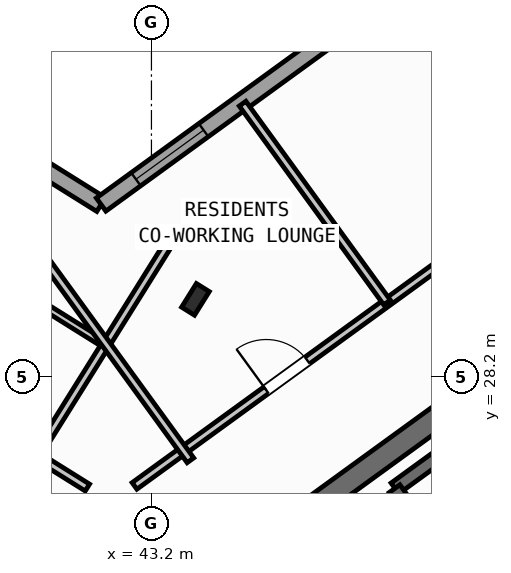
"""IFC4 building model, lengths in metres.
Left out: names, types, materials, properties, quantities, classifications, styles, units other than length and angle.
Written with IfcOpenShell. Run it as: python <this file> out.ifc"""

import sys

from ifc_helpers import new_model, si_unit, direction, frame, frame_2d, origin, origin_2d, place, context, subcontext, project, spatial, rectangle, i_section, extrude, source, transform, mapped, element, fill, save


model = new_model("IFC4")
c1 = context("Model", 3, precision=1e-05, world=origin(), true_north=direction((0.0, 1.0)))
c2 = subcontext(c1, "Body", "Model", "MODEL_VIEW")
j1 = project(units=[si_unit("LENGTHUNIT", "METRE"), si_unit("PLANEANGLEUNIT", "RADIAN")], contexts=[c1])
p1 = place(None, origin())
s1 = spatial("IfcSite", under=j1, at=p1, CompositionType="ELEMENT")
p2 = place(p1, origin())
s2 = spatial("IfcBuilding", under=s1, at=p2, CompositionType="ELEMENT")
p3 = place(p2, frame((0.0, 0.0, 214.8)))
s3 = spatial("IfcBuildingStorey", under=s2, at=p3, CompositionType="ELEMENT", Elevation=214.8)
p4 = place(p3, frame((44.406, 24.172, 0.0), z_axis=(0.0, 0.0, 1.0), x_axis=(0.809012867805, 0.587790931986, 0.0)))
e1 = element("IfcWall", 1, at=p4, inside=s3, PredefinedType="SHEAR", context=c2, shape_type="SweptSolid", body=[
    extrude(rectangle(XDim=12.24, YDim=0.45, at=frame_2d((6.12, 0.0))), origin(), (0.0, 0.0, 1.0), 3.35),
])
m1 = source(origin(), c2, "Body", "SweptSolid", [
    extrude(i_section(OverallWidth=0.3, OverallDepth=0.55, WebThickness=0.015, FlangeThickness=0.029, at=origin_2d()), origin(), (0.0, 0.0, 1.0), 3.6),
])
p5 = place(p3, frame((44.068, 29.726, 0.0), z_axis=(0.0, 0.0, 1.0), x_axis=(-0.848048096156, 0.529919264233, 0.0)))
e2 = element("IfcColumn", 2, at=p5, inside=s3, PredefinedType="COLUMN", context=c2, shape_type="MappedRepresentation", body=[
    mapped(m1, transform((0.0, 0.0, 0.0), scale=1.0)),
])
p6 = place(p3, frame((17.424, 47.083, 0.0), z_axis=(0.0, 0.0, 1.0), x_axis=(0.848049927979, -0.529916332693, 0.0)))
e3 = element("IfcWall", 3, at=p6, inside=s3, PredefinedType="STANDARD", context=c2, shape_type="SweptSolid", body=[
    extrude(rectangle(XDim=29.223, YDim=0.32, at=frame_2d((14.612, 0.0))), origin(), (0.0, 0.0, 1.0), 3.35),
])
p7 = place(p6, frame((2.526, 0.0, 0.0)))
e4 = element("IfcOpeningElement", 4, at=p7, cuts=e3, PredefinedType="OPENING", context=c2, shape_type="SweptSolid", body=[
    extrude(rectangle(XDim=1.05, YDim=2.15, at=frame_2d((0.525, 1.075))), frame((0.0, 0.17, 0.0), z_axis=(0.0, -1.0, 0.0), x_axis=(1.0, 0.0, 0.0)), (0.0, 0.0, 1.0), 0.34),
])
p8 = place(p6, frame((0.653, 0.0, 0.9)))
e5 = element("IfcOpeningElement", 5, at=p8, cuts=e3, PredefinedType="OPENING", context=c2, shape_type="SweptSolid", body=[
    extrude(rectangle(XDim=1.35, YDim=1.45, at=frame_2d((0.675, 0.725))), frame((0.0, 0.17, 0.0), z_axis=(0.0, -1.0, 0.0), x_axis=(1.0, 0.0, 0.0)), (0.0, 0.0, 1.0), 0.34),
])
p9 = place(p6, frame((6.897, 0.0, 1.0)))
e6 = element("IfcOpeningElement", 6, at=p9, cuts=e3, PredefinedType="OPENING", context=c2, shape_type="SweptSolid", body=[
    extrude(rectangle(XDim=0.9, YDim=1.25, at=frame_2d((0.45, 0.625))), frame((0.0, 0.17, 0.0), z_axis=(0.0, -1.0, 0.0), x_axis=(1.0, 0.0, 0.0)), (0.0, 0.0, 1.0), 0.34),
])
p10 = place(p6, frame((9.602, 0.0, 0.95)))
e7 = element("IfcOpeningElement", 7, at=p10, cuts=e3, PredefinedType="OPENING", context=c2, shape_type="SweptSolid", body=[
    extrude(rectangle(XDim=1.95, YDim=1.35, at=frame_2d((0.975, 0.675))), frame((0.0, 0.17, 0.0), z_axis=(0.0, -1.0, 0.0), x_axis=(1.0, 0.0, 0.0)), (0.0, 0.0, 1.0), 0.34),
])
p11 = place(p6, frame((14.096, 0.0, 1.0)))
e8 = element("IfcOpeningElement", 8, at=p11, cuts=e3, PredefinedType="OPENING", context=c2, shape_type="SweptSolid", body=[
    extrude(rectangle(XDim=0.9, YDim=1.25, at=frame_2d((0.45, 0.625))), frame((0.0, 0.17, 0.0), z_axis=(0.0, -1.0, 0.0), x_axis=(1.0, 0.0, 0.0)), (0.0, 0.0, 1.0), 0.34),
])
p12 = place(p6, frame((17.254, 0.0, 1.0)))
e9 = element("IfcOpeningElement", 9, at=p12, cuts=e3, PredefinedType="OPENING", context=c2, shape_type="SweptSolid", body=[
    extrude(rectangle(XDim=0.9, YDim=1.25, at=frame_2d((0.45, 0.625))), frame((0.0, 0.17, 0.0), z_axis=(0.0, -1.0, 0.0), x_axis=(1.0, 0.0, 0.0)), (0.0, 0.0, 1.0), 0.34),
])
p13 = place(p6, frame((21.139, 0.0, 0.9)))
e10 = element("IfcOpeningElement", 10, at=p13, cuts=e3, PredefinedType="OPENING", context=c2, shape_type="SweptSolid", body=[
    extrude(rectangle(XDim=1.35, YDim=1.45, at=frame_2d((0.675, 0.725))), frame((0.0, 0.17, 0.0), z_axis=(0.0, -1.0, 0.0), x_axis=(1.0, 0.0, 0.0)), (0.0, 0.0, 1.0), 0.34),
])
p14 = place(p6, frame((25.778, 0.0, 0.9)))
e11 = element("IfcOpeningElement", 11, at=p14, cuts=e3, PredefinedType="OPENING", context=c2, shape_type="SweptSolid", body=[
    extrude(rectangle(XDim=1.35, YDim=1.45, at=frame_2d((0.675, 0.725))), frame((0.0, 0.17, 0.0), z_axis=(0.0, -1.0, 0.0), x_axis=(1.0, 0.0, 0.0)), (0.0, 0.0, 1.0), 0.34),
])
p15 = place(p3, frame((42.207, 31.597, 0.0), z_axis=(0.0, 0.0, 1.0), x_axis=(0.809020333377, 0.587780656523, 0.0)))
e12 = element("IfcWall", 12, at=p15, inside=s3, PredefinedType="STANDARD", context=c2, shape_type="SweptSolid", body=[
    extrude(rectangle(XDim=15.223, YDim=0.32, at=frame_2d((7.611, 0.0))), origin(), (0.0, 0.0, 1.0), 3.35),
])
p16 = place(p15, frame((12.82, 0.0, 0.0)))
e13 = element("IfcOpeningElement", 13, at=p16, cuts=e12, PredefinedType="OPENING", context=c2, shape_type="SweptSolid", body=[
    extrude(rectangle(XDim=1.05, YDim=2.15, at=frame_2d((0.525, 1.075))), frame((0.0, 0.17, 0.0), z_axis=(0.0, -1.0, 0.0), x_axis=(1.0, 0.0, 0.0)), (0.0, 0.0, 1.0), 0.34),
])
p17 = place(p15, frame((0.85, 0.0, 0.9)))
e14 = element("IfcOpeningElement", 14, at=p17, cuts=e12, PredefinedType="OPENING", context=c2, shape_type="SweptSolid", body=[
    extrude(rectangle(XDim=1.65, YDim=1.45, at=frame_2d((0.825, 0.725))), frame((0.0, 0.17, 0.0), z_axis=(0.0, -1.0, 0.0), x_axis=(1.0, 0.0, 0.0)), (0.0, 0.0, 1.0), 0.34),
])
p18 = place(p15, frame((5.769, 0.0, 0.9)))
e15 = element("IfcOpeningElement", 15, at=p18, cuts=e12, PredefinedType="OPENING", context=c2, shape_type="SweptSolid", body=[
    extrude(rectangle(XDim=1.35, YDim=1.45, at=frame_2d((0.675, 0.725))), frame((0.0, 0.17, 0.0), z_axis=(0.0, -1.0, 0.0), x_axis=(1.0, 0.0, 0.0)), (0.0, 0.0, 1.0), 0.34),
])
p19 = place(p15, frame((10.219, 0.0, 1.0)))
e16 = element("IfcOpeningElement", 16, at=p19, cuts=e12, PredefinedType="OPENING", context=c2, shape_type="SweptSolid", body=[
    extrude(rectangle(XDim=0.9, YDim=1.25, at=frame_2d((0.45, 0.625))), frame((0.0, 0.17, 0.0), z_axis=(0.0, -1.0, 0.0), x_axis=(1.0, 0.0, 0.0)), (0.0, 0.0, 1.0), 0.34),
])
p20 = place(p3, frame((48.006, 25.996, 0.0), z_axis=(0.0, 0.0, 1.0), x_axis=(0.80901903764, 0.587782439969, 0.0)))
e17 = element("IfcWall", 17, at=p20, inside=s3, PredefinedType="SHEAR", context=c2, shape_type="SweptSolid", body=[
    extrude(rectangle(XDim=7.46, YDim=0.26, at=frame_2d((3.73, 0.0))), origin(), (0.0, 0.0, 1.0), 3.35),
])
p21 = place(p3, frame((49.855, 23.434, 0.0), z_axis=(0.0, 0.0, 1.0), x_axis=(-0.58776738483, 0.809029975545, 0.0)))
e18 = element("IfcWall", 18, at=p21, inside=s3, PredefinedType="SHEAR", context=c2, shape_type="SweptSolid", body=[
    extrude(rectangle(XDim=3.16, YDim=0.26, at=frame_2d((1.58, 0.0))), origin(), (0.0, 0.0, 1.0), 3.35),
])
p22 = place(p3, frame((41.936, 26.012, 0.0), z_axis=(0.0, 0.0, 1.0), x_axis=(-0.848051154596, 0.529914369676, 0.0)))
e19 = element("IfcWall", 19, at=p22, inside=s3, PredefinedType="PARTITIONING", context=c2, shape_type="SweptSolid", body=[
    extrude(rectangle(XDim=15.57, YDim=0.16, at=frame_2d((7.785, 0.0))), origin(), (0.0, 0.0, 1.0), 3.34),
])
p23 = place(p22, frame((10.83, 0.0, 0.0)))
e20 = element("IfcOpeningElement", 20, at=p23, cuts=e19, PredefinedType="OPENING", context=c2, shape_type="SweptSolid", body=[
    extrude(rectangle(XDim=1.0, YDim=2.1, at=frame_2d((0.5, 1.05))), frame((0.0, 0.09, 0.0), z_axis=(0.0, -1.0, 0.0), x_axis=(1.0, 0.0, 0.0)), (0.0, 0.0, 1.0), 0.18),
])
p24 = place(p3, frame((43.704, 31.086, 0.0), z_axis=(0.0, 0.0, 1.0), x_axis=(-0.529906828443, -0.848055866774, 0.0)))
e21 = element("IfcWall", 21, at=p24, inside=s3, PredefinedType="PARTITIONING", context=c2, shape_type="SweptSolid", body=[
    extrude(rectangle(XDim=5.48, YDim=0.16, at=frame_2d((2.74, 0.0))), origin(), (0.0, 0.0, 1.0), 3.34),
])
p25 = place(p3, frame((42.226, 28.873, 0.0), z_axis=(0.0, 0.0, 1.0), x_axis=(-0.848049134363, 0.529917602752, 0.0)))
e22 = element("IfcWall", 22, at=p25, inside=s3, PredefinedType="PLUMBINGWALL", context=c2, shape_type="SweptSolid", body=[
    extrude(rectangle(XDim=14.3, YDim=0.14, at=frame_2d((7.15, 0.0))), origin(), (0.0, 0.0, 1.0), 3.34),
])
p26 = place(p25, frame((9.57, 0.0, 0.0)))
e23 = element("IfcOpeningElement", 23, at=p26, cuts=e22, PredefinedType="OPENING", context=c2, shape_type="SweptSolid", body=[
    extrude(rectangle(XDim=0.92, YDim=2.08, at=frame_2d((0.46, 1.04))), frame((0.0, 0.08, 0.0), z_axis=(0.0, -1.0, 0.0), x_axis=(1.0, 0.0, 0.0)), (0.0, 0.0, 1.0), 0.16),
])
p27 = place(p3, frame((42.866, 26.044, 0.0), z_axis=(0.0, 0.0, 1.0), x_axis=(0.809020254154, 0.587780765566, 0.0)))
e24 = element("IfcWall", 24, at=p27, inside=s3, PredefinedType="PARTITIONING", context=c2, shape_type="SweptSolid", body=[
    extrude(rectangle(XDim=14.67, YDim=0.16, at=frame_2d((7.335, 0.0))), origin(), (0.0, 0.0, 1.0), 3.34),
])
p28 = place(p27, frame((3.215, 0.0, 0.0)))
e25 = element("IfcOpeningElement", 25, at=p28, cuts=e24, PredefinedType="OPENING", context=c2, shape_type="SweptSolid", body=[
    extrude(rectangle(XDim=1.0, YDim=2.1, at=frame_2d((0.5, 1.05))), frame((0.0, 0.09, 0.0), z_axis=(0.0, -1.0, 0.0), x_axis=(1.0, 0.0, 0.0)), (0.0, 0.0, 1.0), 0.18),
])
p29 = place(p27, frame((9.915, 0.0, 0.0)))
e26 = element("IfcOpeningElement", 26, at=p29, cuts=e24, PredefinedType="OPENING", context=c2, shape_type="SweptSolid", body=[
    extrude(rectangle(XDim=1.0, YDim=2.1, at=frame_2d((0.5, 1.05))), frame((0.0, 0.09, 0.0), z_axis=(0.0, -1.0, 0.0), x_axis=(1.0, 0.0, 0.0)), (0.0, 0.0, 1.0), 0.18),
])
p30 = place(p3, frame((43.969, 26.55, 0.0), z_axis=(0.0, 0.0, 1.0), x_axis=(-0.587776919386, 0.80902304852, 0.0)))
e27 = element("IfcWall", 27, at=p30, inside=s3, PredefinedType="PARTITIONING", context=c2, shape_type="SweptSolid", body=[
    extrude(rectangle(XDim=5.48, YDim=0.16, at=frame_2d((2.74, 0.0))), origin(), (0.0, 0.0, 1.0), 3.34),
])
p31 = place(p3, frame((47.849, 29.665, 0.0), z_axis=(0.0, 0.0, 1.0), x_axis=(-0.587785532001, 0.809016791155, 0.0)))
e28 = element("IfcWall", 28, at=p31, inside=s3, PredefinedType="PARTITIONING", context=c2, shape_type="SweptSolid", body=[
    extrude(rectangle(XDim=4.85, YDim=0.16, at=frame_2d((2.425, 0.0))), origin(), (0.0, 0.0, 1.0), 3.34),
])
m2 = source(origin(), c2, "Body", "SweptSolid", [
    extrude(rectangle(XDim=1.65, YDim=1.45, at=frame_2d((0.825, 0.725))), frame((0.0, 0.03, 0.0), z_axis=(0.0, -1.0, 0.0), x_axis=(1.0, 0.0, 0.0)), (0.0, 0.0, 1.0), 0.06),
])
p32 = place(p17, origin())
e29 = element("IfcWindow", 29, at=p32, inside=s3, PartitioningType="SINGLE_PANEL", PredefinedType="WINDOW", context=c2, shape_type="MappedRepresentation", body=[
    mapped(m2, transform((0.0, 0.0, 0.0), scale=1.0)),
])
fill(e14, e29)
m3 = source(origin(), c2, "Body", "SweptSolid", [
    extrude(rectangle(XDim=1.0, YDim=2.1, at=frame_2d((0.5, 1.05))), frame((0.0, 0.025, 0.0), z_axis=(0.0, -1.0, 0.0), x_axis=(1.0, 0.0, 0.0)), (0.0, 0.0, 1.0), 0.05),
])
p33 = place(p28, origin())
e30 = element("IfcDoor", 30, at=p33, inside=s3, OperationType="SINGLE_SWING_LEFT", PredefinedType="DOOR", context=c2, shape_type="MappedRepresentation", body=[
    mapped(m3, transform((0.0, 0.0, 0.0), scale=1.0)),
])
fill(e25, e30)
save(model, sys.argv[1])
